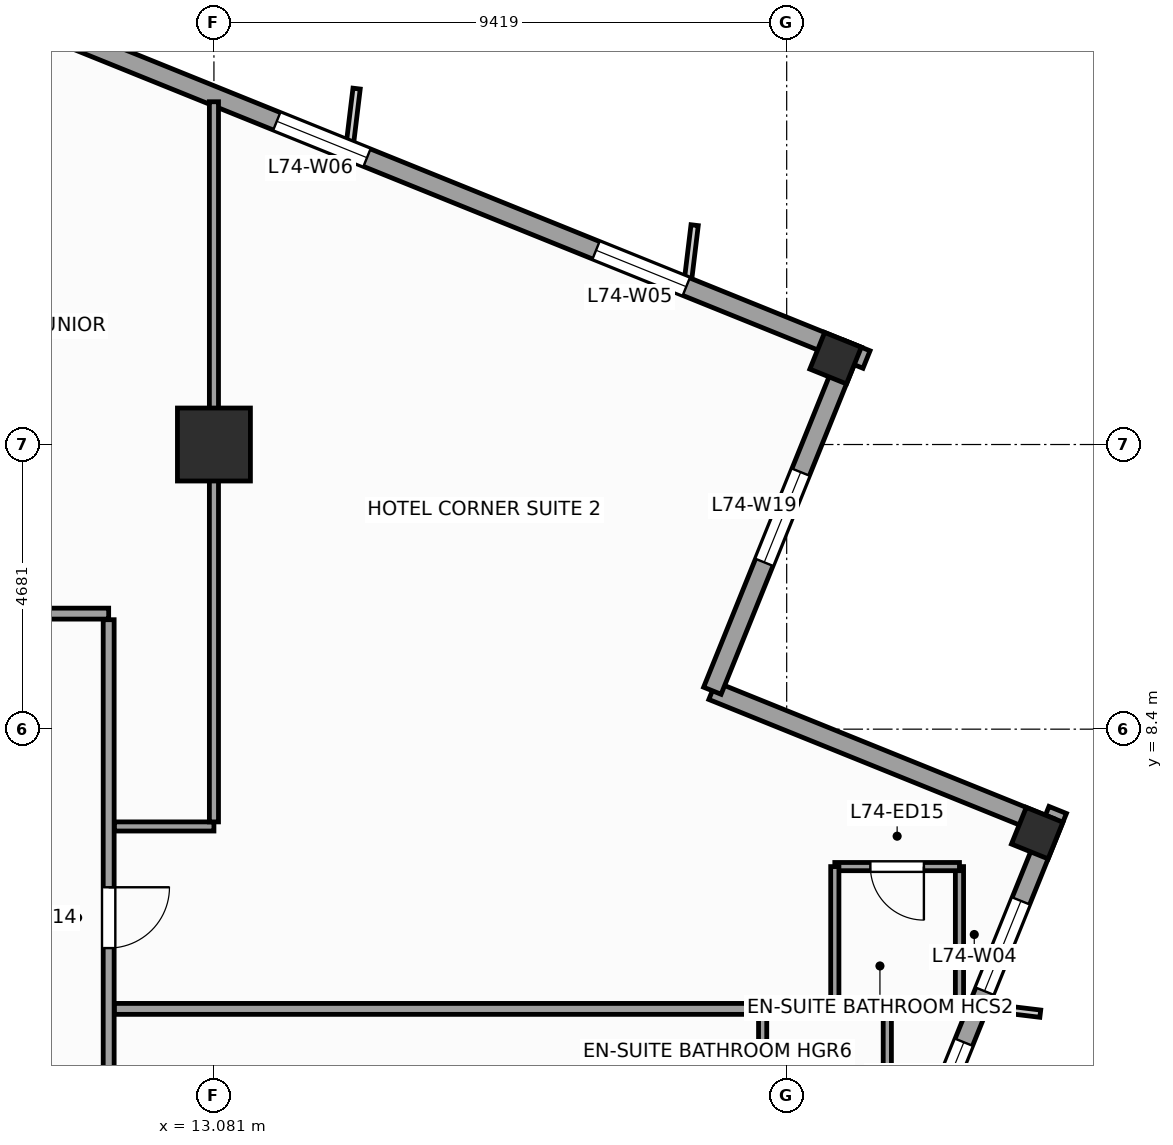
"""IFC4 building model, lengths in metres.
Left out: names, types, materials, properties, quantities, classifications, styles, units other than length and angle.
Written with IfcOpenShell. Run it as: python <this file> out.ifc"""

import sys

from ifc_helpers import new_model, si_unit, direction, frame, frame_2d, origin, origin_2d, place, context, subcontext, project, spatial, rectangle, extrude, source, transform, mapped, element, fill, save


model = new_model("IFC4")
c1 = context("Model", 3, precision=1e-05, world=origin(), true_north=direction((0.0, 1.0)))
c2 = subcontext(c1, "Body", "Model", "MODEL_VIEW")
j1 = project(units=[si_unit("LENGTHUNIT", "METRE"), si_unit("PLANEANGLEUNIT", "RADIAN")], contexts=[c1])
p1 = place(None, origin())
s1 = spatial("IfcSite", under=j1, at=p1, CompositionType="ELEMENT")
p2 = place(p1, origin())
s2 = spatial("IfcBuilding", under=s1, at=p2, CompositionType="ELEMENT")
p3 = place(p2, frame((0.0, 0.0, 301.2)))
s3 = spatial("IfcBuildingStorey", under=s2, at=p3, CompositionType="ELEMENT", Elevation=301.2)
m1 = source(origin(), c2, "Body", "SweptSolid", [
    extrude(rectangle(XDim=1.2, YDim=1.2, at=origin_2d()), origin(), (0.0, 0.0, 1.0), 3.6),
])
p4 = place(p3, frame((13.081, 13.081, 0.0), z_axis=(0.0, 0.0, 1.0), x_axis=(1.0, 0.0, 0.0)))
e1 = element("IfcColumn", 1, at=p4, inside=s3, PredefinedType="COLUMN", context=c2, shape_type="MappedRepresentation", body=[
    mapped(m1, transform((0.0, 0.0, 0.0), scale=1.0)),
])
m2 = source(origin(), c2, "Body", "SweptSolid", [
    extrude(rectangle(XDim=0.65, YDim=0.65, at=origin_2d()), origin(), (0.0, 0.0, 1.0), 3.6),
])
for number, where, z_axis, x_axis in (
    (2, (26.62, 6.69, 0.0), (0.0, 0.0, 1.0), (0.375, 0.927, 0.0)),
    (3, (23.304, 14.501, 0.0), (0.0, 0.0, 1.0), (0.375, 0.927, 0.0)),
):
    element("IfcColumn", number, at=place(p3, frame(where, z_axis=z_axis, x_axis=x_axis)), inside=s3, PredefinedType="COLUMN", context=c2, shape_type="MappedRepresentation", body=[
        mapped(m2, transform((0.0, 0.0, 0.0), scale=1.0)),
    ])
p5 = place(p3, frame((14.479, -23.813, 0.0), z_axis=(0.0, 0.0, 1.0), x_axis=(0.374609557019, 0.927182657188, 0.0)))
e4 = element("IfcWall", 4, at=p5, inside=s3, PredefinedType="STANDARD", context=c2, shape_type="SweptSolid", body=[
    extrude(rectangle(XDim=33.31, YDim=0.31, at=frame_2d((16.655, 0.0))), origin(), (0.0, 0.0, 1.0), 2.75),
])
p6 = place(p5, frame((23.08, 0.0, 0.0)))
e5 = element("IfcOpeningElement", 5, at=p6, cuts=e4, PredefinedType="OPENING", context=c2, shape_type="SweptSolid", body=[
    extrude(rectangle(XDim=1.05, YDim=2.25, at=frame_2d((0.525, 1.125))), frame((0.0, 0.165, 0.0), z_axis=(0.0, -1.0, 0.0), x_axis=(1.0, 0.0, 0.0)), (0.0, 0.0, 1.0), 0.33),
])
p7 = place(p5, frame((3.197, 0.0, 0.47)))
e6 = element("IfcOpeningElement", 6, at=p7, cuts=e4, PredefinedType="OPENING", context=c2, shape_type="SweptSolid", body=[
    extrude(rectangle(XDim=1.6, YDim=2.1, at=frame_2d((0.8, 1.05))), frame((0.0, 0.165, 0.0), z_axis=(0.0, -1.0, 0.0), x_axis=(1.0, 0.0, 0.0)), (0.0, 0.0, 1.0), 0.33),
])
p8 = place(p5, frame((8.86, 0.0, 0.47)))
e7 = element("IfcOpeningElement", 7, at=p8, cuts=e4, PredefinedType="OPENING", context=c2, shape_type="SweptSolid", body=[
    extrude(rectangle(XDim=1.6, YDim=2.1, at=frame_2d((0.8, 1.05))), frame((0.0, 0.165, 0.0), z_axis=(0.0, -1.0, 0.0), x_axis=(1.0, 0.0, 0.0)), (0.0, 0.0, 1.0), 0.33),
])
p9 = place(p5, frame((14.439, 0.0, 0.47)))
e8 = element("IfcOpeningElement", 8, at=p9, cuts=e4, PredefinedType="OPENING", context=c2, shape_type="SweptSolid", body=[
    extrude(rectangle(XDim=1.6, YDim=2.1, at=frame_2d((0.8, 1.05))), frame((0.0, 0.165, 0.0), z_axis=(0.0, -1.0, 0.0), x_axis=(1.0, 0.0, 0.0)), (0.0, 0.0, 1.0), 0.33),
])
p10 = place(p5, frame((30.097, 0.0, 0.47)))
e9 = element("IfcOpeningElement", 9, at=p10, cuts=e4, PredefinedType="OPENING", context=c2, shape_type="SweptSolid", body=[
    extrude(rectangle(XDim=1.6, YDim=2.1, at=frame_2d((0.8, 1.05))), frame((0.0, 0.165, 0.0), z_axis=(0.0, -1.0, 0.0), x_axis=(1.0, 0.0, 0.0)), (0.0, 0.0, 1.0), 0.33),
])
p11 = place(p5, frame((27.59, 0.0, 0.47)))
e10 = element("IfcOpeningElement", 10, at=p11, cuts=e4, PredefinedType="OPENING", context=c2, shape_type="SweptSolid", body=[
    extrude(rectangle(XDim=1.6, YDim=2.1, at=frame_2d((0.8, 1.05))), frame((0.0, 0.165, 0.0), z_axis=(0.0, -1.0, 0.0), x_axis=(1.0, 0.0, 0.0)), (0.0, 0.0, 1.0), 0.33),
])
p12 = place(p3, frame((26.841, 6.784, 0.0), z_axis=(0.0, 0.0, 1.0), x_axis=(-0.927171722085, 0.374636620962, 0.0)))
e11 = element("IfcWall", 11, at=p12, inside=s3, PredefinedType="STANDARD", context=c2, shape_type="SweptSolid", body=[
    extrude(rectangle(XDim=6.0, YDim=0.31, at=frame_2d((3.0, 0.0))), origin(), (0.0, 0.0, 1.0), 2.65),
])
p13 = place(p3, frame((21.278, 9.032, 0.0), z_axis=(0.0, 0.0, 1.0), x_axis=(0.374602739196, 0.927185411764, 0.0)))
e12 = element("IfcWall", 12, at=p13, inside=s3, PredefinedType="STANDARD", context=c2, shape_type="SweptSolid", body=[
    extrude(rectangle(XDim=6.155, YDim=0.31, at=frame_2d((3.078, 0.0))), origin(), (0.0, 0.0, 1.0), 3.35),
])
p14 = place(p13, frame((2.278, 0.0, 0.47)))
e13 = element("IfcOpeningElement", 13, at=p14, cuts=e12, PredefinedType="OPENING", context=c2, shape_type="SweptSolid", body=[
    extrude(rectangle(XDim=1.6, YDim=2.1, at=frame_2d((0.8, 1.05))), frame((0.0, 0.165, 0.0), z_axis=(0.0, -1.0, 0.0), x_axis=(1.0, 0.0, 0.0)), (0.0, 0.0, 1.0), 0.33),
])
p15 = place(p3, frame((23.813, 14.479, 0.0), z_axis=(0.0, 0.0, 1.0), x_axis=(-0.927182657188, 0.374609557019, 0.0)))
e14 = element("IfcWall", 14, at=p15, inside=s3, PredefinedType="STANDARD", context=c2, shape_type="SweptSolid", body=[
    extrude(rectangle(XDim=33.31, YDim=0.31, at=frame_2d((16.655, 0.0))), origin(), (0.0, 0.0, 1.0), 2.75),
])
p16 = place(p15, frame((3.197, 0.0, 0.47)))
e15 = element("IfcOpeningElement", 15, at=p16, cuts=e14, PredefinedType="OPENING", context=c2, shape_type="SweptSolid", body=[
    extrude(rectangle(XDim=1.6, YDim=2.1, at=frame_2d((0.8, 1.05))), frame((0.0, 0.165, 0.0), z_axis=(0.0, -1.0, 0.0), x_axis=(1.0, 0.0, 0.0)), (0.0, 0.0, 1.0), 0.33),
])
p17 = place(p15, frame((8.86, 0.0, 0.47)))
e16 = element("IfcOpeningElement", 16, at=p17, cuts=e14, PredefinedType="OPENING", context=c2, shape_type="SweptSolid", body=[
    extrude(rectangle(XDim=1.6, YDim=2.1, at=frame_2d((0.8, 1.05))), frame((0.0, 0.165, 0.0), z_axis=(0.0, -1.0, 0.0), x_axis=(1.0, 0.0, 0.0)), (0.0, 0.0, 1.0), 0.33),
])
p18 = place(p15, frame((14.439, 0.0, 0.47)))
e17 = element("IfcOpeningElement", 17, at=p18, cuts=e14, PredefinedType="OPENING", context=c2, shape_type="SweptSolid", body=[
    extrude(rectangle(XDim=1.6, YDim=2.1, at=frame_2d((0.8, 1.05))), frame((0.0, 0.165, 0.0), z_axis=(0.0, -1.0, 0.0), x_axis=(1.0, 0.0, 0.0)), (0.0, 0.0, 1.0), 0.33),
])
p19 = place(p15, frame((22.601, 0.0, 0.47)))
e18 = element("IfcOpeningElement", 18, at=p19, cuts=e14, PredefinedType="OPENING", context=c2, shape_type="SweptSolid", body=[
    extrude(rectangle(XDim=1.6, YDim=2.1, at=frame_2d((0.8, 1.05))), frame((0.0, 0.165, 0.0), z_axis=(0.0, -1.0, 0.0), x_axis=(1.0, 0.0, 0.0)), (0.0, 0.0, 1.0), 0.33),
])
p20 = place(p15, frame((25.597, 0.0, 0.47)))
e19 = element("IfcOpeningElement", 19, at=p20, cuts=e14, PredefinedType="OPENING", context=c2, shape_type="SweptSolid", body=[
    extrude(rectangle(XDim=1.6, YDim=2.1, at=frame_2d((0.8, 1.05))), frame((0.0, 0.165, 0.0), z_axis=(0.0, -1.0, 0.0), x_axis=(1.0, 0.0, 0.0)), (0.0, 0.0, 1.0), 0.33),
])
p21 = place(p3, frame((-10.3, 10.3, 0.0), z_axis=(0.0, 0.0, 1.0), x_axis=(1.0, 0.0, 0.0)))
e20 = element("IfcWall", 20, at=p21, inside=s3, PredefinedType="PARTITIONING", context=c2, shape_type="SweptSolid", body=[
    extrude(rectangle(XDim=21.65, YDim=0.18, at=frame_2d((10.825, 0.0))), origin(), (0.0, 0.0, 1.0), 3.35),
])
p22 = place(p21, frame((2.564, 0.0, 0.0)))
e21 = element("IfcOpeningElement", 21, at=p22, cuts=e20, PredefinedType="OPENING", context=c2, shape_type="SweptSolid", body=[
    extrude(rectangle(XDim=1.0, YDim=2.15, at=frame_2d((0.5, 1.075))), frame((0.0, 0.1, 0.0), z_axis=(0.0, -1.0, 0.0), x_axis=(1.0, 0.0, 0.0)), (0.0, 0.0, 1.0), 0.2),
])
p23 = place(p21, frame((8.05, 0.0, 0.0)))
e22 = element("IfcOpeningElement", 22, at=p23, cuts=e20, PredefinedType="OPENING", context=c2, shape_type="SweptSolid", body=[
    extrude(rectangle(XDim=1.0, YDim=2.15, at=frame_2d((0.5, 1.075))), frame((0.0, 0.1, 0.0), z_axis=(0.0, -1.0, 0.0), x_axis=(1.0, 0.0, 0.0)), (0.0, 0.0, 1.0), 0.2),
])
p24 = place(p21, frame((12.54, 0.0, 0.0)))
e23 = element("IfcOpeningElement", 23, at=p24, cuts=e20, PredefinedType="OPENING", context=c2, shape_type="SweptSolid", body=[
    extrude(rectangle(XDim=1.0, YDim=2.15, at=frame_2d((0.5, 1.075))), frame((0.0, 0.1, 0.0), z_axis=(0.0, -1.0, 0.0), x_axis=(1.0, 0.0, 0.0)), (0.0, 0.0, 1.0), 0.2),
])
p25 = place(p21, frame((18.871, 0.0, 0.0)))
e24 = element("IfcOpeningElement", 24, at=p25, cuts=e20, PredefinedType="OPENING", context=c2, shape_type="SweptSolid", body=[
    extrude(rectangle(XDim=1.0, YDim=2.15, at=frame_2d((0.5, 1.075))), frame((0.0, 0.1, 0.0), z_axis=(0.0, -1.0, 0.0), x_axis=(1.0, 0.0, 0.0)), (0.0, 0.0, 1.0), 0.2),
])
p26 = place(p3, frame((11.35, -12.35, 0.0), z_axis=(0.0, 0.0, 1.0), x_axis=(0.0, 1.0, 0.0)))
e25 = element("IfcWall", 25, at=p26, inside=s3, PredefinedType="PARTITIONING", context=c2, shape_type="SweptSolid", body=[
    extrude(rectangle(XDim=22.55, YDim=0.18, at=frame_2d((11.275, 0.0))), origin(), (0.0, 0.0, 1.0), 3.35),
])
p27 = place(p26, frame((17.15, 0.0, 0.0)))
e26 = element("IfcOpeningElement", 26, at=p27, cuts=e25, PredefinedType="OPENING", context=c2, shape_type="SweptSolid", body=[
    extrude(rectangle(XDim=1.0, YDim=2.15, at=frame_2d((0.5, 1.075))), frame((0.0, 0.1, 0.0), z_axis=(0.0, -1.0, 0.0), x_axis=(1.0, 0.0, 0.0)), (0.0, 0.0, 1.0), 0.2),
])
p28 = place(p26, frame((13.5, 0.0, 0.0)))
e27 = element("IfcOpeningElement", 27, at=p28, cuts=e25, PredefinedType="OPENING", context=c2, shape_type="SweptSolid", body=[
    extrude(rectangle(XDim=1.0, YDim=2.15, at=frame_2d((0.5, 1.075))), frame((0.0, 0.1, 0.0), z_axis=(0.0, -1.0, 0.0), x_axis=(1.0, 0.0, 0.0)), (0.0, 0.0, 1.0), 0.2),
])
p29 = place(p26, frame((9.5, 0.0, 0.0)))
e28 = element("IfcOpeningElement", 28, at=p29, cuts=e25, PredefinedType="OPENING", context=c2, shape_type="SweptSolid", body=[
    extrude(rectangle(XDim=1.0, YDim=2.15, at=frame_2d((0.5, 1.075))), frame((0.0, 0.1, 0.0), z_axis=(0.0, -1.0, 0.0), x_axis=(1.0, 0.0, 0.0)), (0.0, 0.0, 1.0), 0.2),
])
p30 = place(p26, frame((6.35, 0.0, 0.0)))
e29 = element("IfcOpeningElement", 29, at=p30, cuts=e25, PredefinedType="OPENING", context=c2, shape_type="SweptSolid", body=[
    extrude(rectangle(XDim=1.0, YDim=2.15, at=frame_2d((0.5, 1.075))), frame((0.0, 0.1, 0.0), z_axis=(0.0, -1.0, 0.0), x_axis=(1.0, 0.0, 0.0)), (0.0, 0.0, 1.0), 0.2),
])
p31 = place(p26, frame((2.439, 0.0, 0.0)))
e30 = element("IfcOpeningElement", 30, at=p31, cuts=e25, PredefinedType="OPENING", context=c2, shape_type="SweptSolid", body=[
    extrude(rectangle(XDim=1.0, YDim=2.15, at=frame_2d((0.5, 1.075))), frame((0.0, 0.1, 0.0), z_axis=(0.0, -1.0, 0.0), x_axis=(1.0, 0.0, 0.0)), (0.0, 0.0, 1.0), 0.2),
])
p32 = place(p3, frame((11.445, 3.8, 0.0), z_axis=(0.0, 0.0, 1.0), x_axis=(1.0, 0.0, 0.0)))
e31 = element("IfcWall", 31, at=p32, inside=s3, PredefinedType="PARTITIONING", context=c2, shape_type="SweptSolid", body=[
    extrude(rectangle(XDim=14.093, YDim=0.18, at=frame_2d((7.046, 0.0))), origin(), (0.0, 0.0, 1.0), 3.35),
])
p33 = place(p3, frame((11.445, 6.8, 0.0), z_axis=(0.0, 0.0, 1.0), x_axis=(1.0, 0.0, 0.0)))
e32 = element("IfcWall", 32, at=p33, inside=s3, PredefinedType="PARTITIONING", context=c2, shape_type="SweptSolid", body=[
    extrude(rectangle(XDim=1.636, YDim=0.15, at=frame_2d((0.818, 0.0))), origin(), (0.0, 0.0, 1.0), 3.35),
])
p34 = place(p3, frame((13.081, 6.875, 0.0), z_axis=(0.0, 0.0, 1.0), x_axis=(0.0, 1.0, 0.0)))
e33 = element("IfcWall", 33, at=p34, inside=s3, PredefinedType="PARTITIONING", context=c2, shape_type="SweptSolid", body=[
    extrude(rectangle(XDim=11.843, YDim=0.15, at=frame_2d((5.921, 0.0))), origin(), (0.0, 0.0, 1.0), 2.45),
])
p35 = place(p3, frame((25.342, 3.89, 0.0), z_axis=(0.0, 0.0, 1.0), x_axis=(0.0, 1.0, 0.0)))
e34 = element("IfcWall", 34, at=p35, inside=s3, PredefinedType="PARTITIONING", context=c2, shape_type="SweptSolid", body=[
    extrude(rectangle(XDim=2.25, YDim=0.135, at=frame_2d((1.125, 0.0))), origin(), (0.0, 0.0, 1.0), 2.75),
])
p36 = place(p3, frame((23.292, 6.14, 0.0), z_axis=(0.0, 0.0, 1.0), x_axis=(1.0, 0.0, 0.0)))
e35 = element("IfcWall", 35, at=p36, inside=s3, PredefinedType="PARTITIONING", context=c2, shape_type="SweptSolid", body=[
    extrude(rectangle(XDim=2.05, YDim=0.135, at=frame_2d((1.025, 0.0))), origin(), (0.0, 0.0, 1.0), 3.35),
])
p37 = place(p36, frame((0.585, 0.0, 0.0)))
e36 = element("IfcOpeningElement", 36, at=p37, cuts=e35, PredefinedType="OPENING", context=c2, shape_type="SweptSolid", body=[
    extrude(rectangle(XDim=0.88, YDim=2.1, at=frame_2d((0.44, 1.05))), frame((0.0, 0.078, 0.0), z_axis=(0.0, -1.0, 0.0), x_axis=(1.0, 0.0, 0.0)), (0.0, 0.0, 1.0), 0.155),
])
p38 = place(p3, frame((23.292, 3.89, 0.0), z_axis=(0.0, 0.0, 1.0), x_axis=(0.0, 1.0, 0.0)))
e37 = element("IfcWall", 37, at=p38, inside=s3, PredefinedType="PARTITIONING", context=c2, shape_type="SweptSolid", body=[
    extrude(rectangle(XDim=2.25, YDim=0.135, at=frame_2d((1.125, 0.0))), origin(), (0.0, 0.0, 1.0), 2.95),
])
for number, where, z_axis, x_axis in (
    (38, (24.155, 1.46, 0.0), (0.0, 0.0, 1.0), (0.0, 1.0, 0.0)),
    (39, (22.105, 1.46, 0.0), (0.0, 0.0, 1.0), (0.0, 1.0, 0.0)),
):
    element("IfcWall", number, at=place(p3, frame(where, z_axis=z_axis, x_axis=x_axis)), inside=s3, PredefinedType="PARTITIONING", context=c2, shape_type="SweptSolid", body=[
        extrude(rectangle(XDim=2.25, YDim=0.135, at=frame_2d((1.125, 0.0))), origin(), (0.0, 0.0, 1.0), 3.35),
    ])
m3 = source(origin(), c2, "Body", "SweptSolid", [
    extrude(rectangle(XDim=1.6, YDim=2.1, at=frame_2d((0.8, 1.05))), frame((0.0, 0.03, 0.0), z_axis=(0.0, -1.0, 0.0), x_axis=(1.0, 0.0, 0.0)), (0.0, 0.0, 1.0), 0.06),
])
p39 = place(p10, origin())
e40 = element("IfcWindow", 40, at=p39, inside=s3, PartitioningType="SINGLE_PANEL", PredefinedType="WINDOW", context=c2, shape_type="MappedRepresentation", body=[
    mapped(m3, transform((0.0, 0.0, 0.0), scale=1.0)),
])
fill(e9, e40)
p40 = place(p16, origin())
e41 = element("IfcWindow", 41, at=p40, inside=s3, PartitioningType="SINGLE_PANEL", PredefinedType="WINDOW", context=c2, shape_type="MappedRepresentation", body=[
    mapped(m3, transform((0.0, 0.0, 0.0), scale=1.0)),
])
fill(e15, e41)
p41 = place(p17, origin())
e42 = element("IfcWindow", 42, at=p41, inside=s3, PartitioningType="SINGLE_PANEL", PredefinedType="WINDOW", context=c2, shape_type="MappedRepresentation", body=[
    mapped(m3, transform((0.0, 0.0, 0.0), scale=1.0)),
])
fill(e16, e42)
p42 = place(p14, origin())
e43 = element("IfcWindow", 43, at=p42, inside=s3, PartitioningType="SINGLE_PANEL", PredefinedType="WINDOW", context=c2, shape_type="MappedRepresentation", body=[
    mapped(m3, transform((0.0, 0.0, 0.0), scale=1.0)),
])
fill(e13, e43)
m4 = source(origin(), c2, "Body", "SweptSolid", [
    extrude(rectangle(XDim=1.0, YDim=2.15, at=frame_2d((0.5, 1.075))), frame((0.0, 0.025, 0.0), z_axis=(0.0, -1.0, 0.0), x_axis=(1.0, 0.0, 0.0)), (0.0, 0.0, 1.0), 0.05),
])
p43 = place(p27, frame((1.0, 0.0, 0.0), z_axis=(0.0, 0.0, 1.0), x_axis=(-1.0, 0.0, 0.0)))
e44 = element("IfcDoor", 44, at=p43, inside=s3, OperationType="SINGLE_SWING_RIGHT", PredefinedType="DOOR", context=c2, shape_type="MappedRepresentation", body=[
    mapped(m4, transform((0.0, 0.0, 0.0), scale=1.0)),
])
fill(e26, e44)
m5 = source(origin(), c2, "Body", "SweptSolid", [
    extrude(rectangle(XDim=0.88, YDim=2.1, at=frame_2d((0.44, 1.05))), frame((0.0, 0.025, 0.0), z_axis=(0.0, -1.0, 0.0), x_axis=(1.0, 0.0, 0.0)), (0.0, 0.0, 1.0), 0.05),
])
p44 = place(p37, frame((0.88, 0.0, 0.0), z_axis=(0.0, 0.0, 1.0), x_axis=(-1.0, 0.0, 0.0)))
e45 = element("IfcDoor", 45, at=p44, inside=s3, OperationType="SINGLE_SWING_RIGHT", PredefinedType="DOOR", context=c2, shape_type="MappedRepresentation", body=[
    mapped(m5, transform((0.0, 0.0, 0.0), scale=1.0)),
])
fill(e36, e45)
p45 = place(p11, origin())
e46 = element("IfcWindow", 46, at=p45, inside=s3, PartitioningType="SINGLE_PANEL", PredefinedType="WINDOW", context=c2, shape_type="MappedRepresentation", body=[
    mapped(m3, transform((0.0, 0.0, 0.0), scale=1.0)),
])
fill(e10, e46)
save(model, sys.argv[1])
